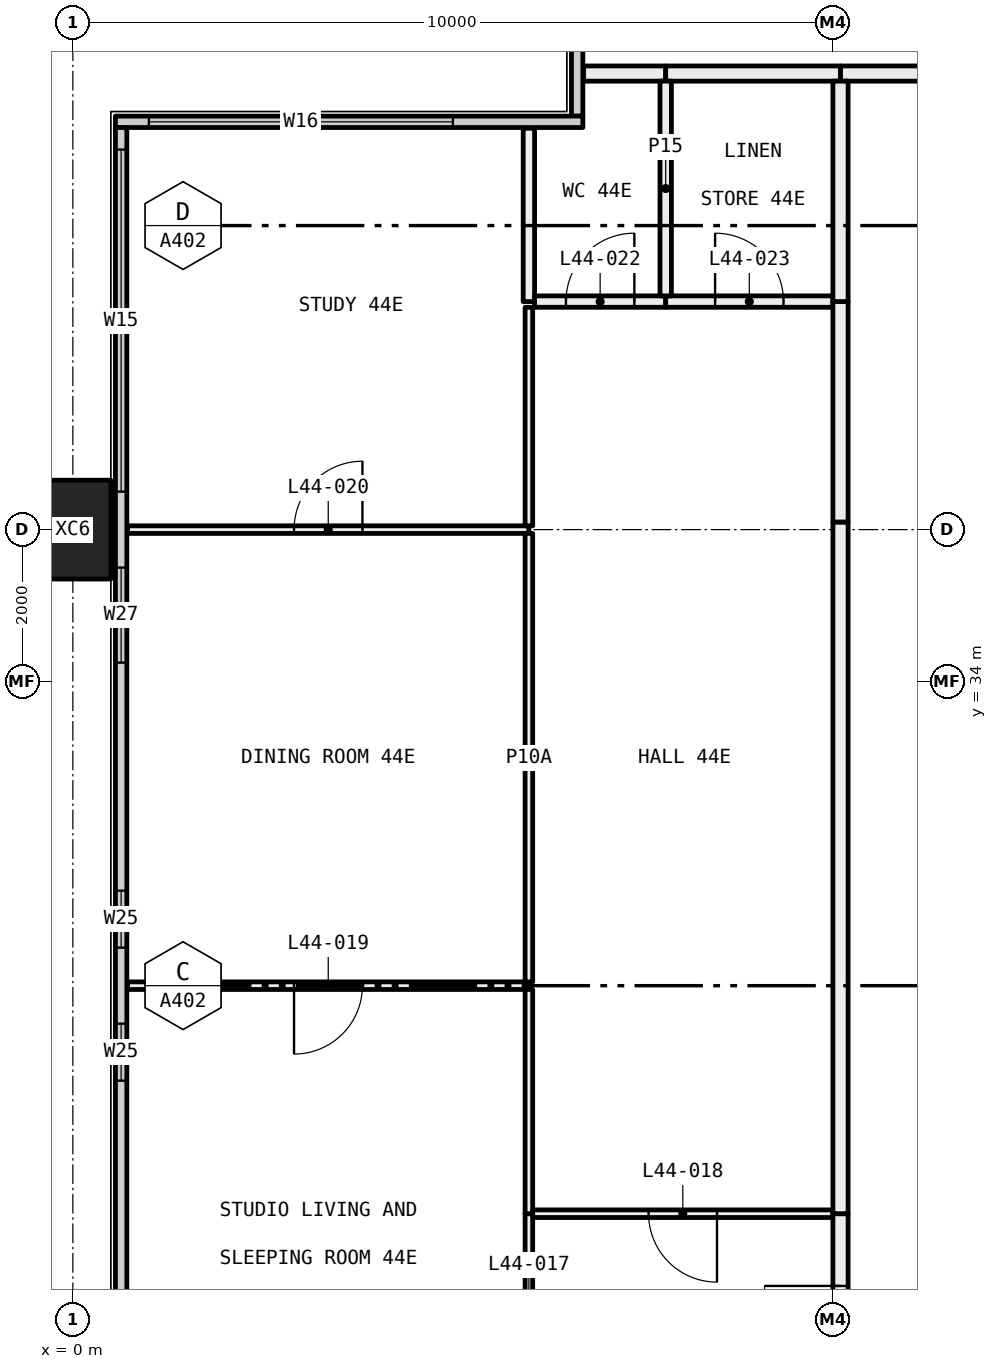
"""IFC4 building model, lengths in metres.
Left out: names, types, materials, properties, quantities, classifications, styles, units other than length and angle.
Written with IfcOpenShell. Run it as: python <this file> out.ifc"""

import sys

from ifc_helpers import new_model, si_unit, direction, frame, frame_2d, origin, origin_2d, place, context, subcontext, project, spatial, rectangle, hollow_rectangle, extrude, element, fill, save


model = new_model("IFC4")
c1 = context("Model", 3, precision=1e-05, world=origin(), true_north=direction((0.0, 1.0)))
c2 = subcontext(c1, "Body", "Model", "MODEL_VIEW")
j1 = project(units=[si_unit("LENGTHUNIT", "METRE"), si_unit("PLANEANGLEUNIT", "RADIAN")], contexts=[c1])
p1 = place(None, origin())
s1 = spatial("IfcSite", under=j1, at=p1, CompositionType="ELEMENT")
p2 = place(p1, origin())
s2 = spatial("IfcBuilding", under=s1, at=p2, CompositionType="ELEMENT")
p3 = place(p2, frame((0.0, 0.0, 168.6)))
s3 = spatial("IfcBuildingStorey", under=s2, at=p3, CompositionType="ELEMENT", Elevation=168.6)
p4 = place(p3, frame((0.0, 36.0, -0.4), z_axis=(0.0, 0.0, 1.0), x_axis=(0.0, 1.0, 0.0)))
e1 = element("IfcColumn", 1, at=p4, inside=s3, PredefinedType="COLUMN", context=c2, shape_type="SweptSolid", body=[
    extrude(hollow_rectangle(XDim=1.3, YDim=1.0, WallThickness=0.05, at=origin_2d()), origin(), (0.0, 0.0, 1.0), 3.45),
])
p5 = place(p3, frame((6.635, 41.44, 0.0), z_axis=(0.0, 0.0, 1.0), x_axis=(0.0, 1.0, 0.0)))
e2 = element("IfcWall", 2, at=p5, inside=s3, PredefinedType="ELEMENTEDWALL", context=c2, shape_type="SweptSolid", body=[
    extrude(rectangle(XDim=5.85, YDim=0.15, at=frame_2d((2.925, 0.0))), origin(), (0.0, 0.0, 1.0), 3.05),
])
p6 = place(p5, frame((1.56, 0.0, 0.45)))
e3 = element("IfcOpeningElement", 3, at=p6, cuts=e2, PredefinedType="OPENING", context=c2, shape_type="SweptSolid", body=[
    extrude(rectangle(XDim=4.0, YDim=2.55, at=frame_2d((2.0, 1.275))), frame((0.0, 0.085, 0.0), z_axis=(0.0, -1.0, 0.0), x_axis=(1.0, 0.0, 0.0)), (0.0, 0.0, 1.0), 0.17),
])
p7 = place(p3, frame((0.56, 41.365, 0.0), z_axis=(0.0, 0.0, 1.0), x_axis=(1.0, 0.0, 0.0)))
e4 = element("IfcWall", 4, at=p7, inside=s3, PredefinedType="ELEMENTEDWALL", context=c2, shape_type="SweptSolid", body=[
    extrude(rectangle(XDim=6.15, YDim=0.15, at=frame_2d((3.075, 0.0))), origin(), (0.0, 0.0, 1.0), 3.05),
])
p8 = place(p7, frame((0.44, 0.0, 0.45)))
e5 = element("IfcOpeningElement", 5, at=p8, cuts=e4, PredefinedType="OPENING", context=c2, shape_type="SweptSolid", body=[
    extrude(rectangle(XDim=4.0, YDim=2.55, at=frame_2d((2.0, 1.275))), frame((0.0, 0.085, 0.0), z_axis=(0.0, -1.0, 0.0), x_axis=(1.0, 0.0, 0.0)), (0.0, 0.0, 1.0), 0.17),
])
p9 = place(p3, frame((0.635, 18.71, 0.0), z_axis=(0.0, 0.0, 1.0), x_axis=(0.0, 1.0, 0.0)))
e6 = element("IfcWall", 6, at=p9, inside=s3, PredefinedType="ELEMENTEDWALL", context=c2, shape_type="SweptSolid", body=[
    extrude(rectangle(XDim=22.58, YDim=0.15, at=frame_2d((11.29, 0.0))), origin(), (0.0, 0.0, 1.0), 3.05),
])
p10 = place(p9, frame((0.29, 0.0, 0.45)))
e7 = element("IfcOpeningElement", 7, at=p10, cuts=e6, PredefinedType="OPENING", context=c2, shape_type="SweptSolid", body=[
    extrude(rectangle(XDim=4.5, YDim=2.55, at=frame_2d((2.25, 1.275))), frame((0.0, 0.085, 0.0), z_axis=(0.0, -1.0, 0.0), x_axis=(1.0, 0.0, 0.0)), (0.0, 0.0, 1.0), 0.17),
])
p11 = place(p9, frame((5.79, 0.0, 0.45)))
e8 = element("IfcOpeningElement", 8, at=p11, cuts=e6, PredefinedType="OPENING", context=c2, shape_type="SweptSolid", body=[
    extrude(rectangle(XDim=1.25, YDim=2.55, at=frame_2d((0.625, 1.275))), frame((0.0, 0.085, 0.0), z_axis=(0.0, -1.0, 0.0), x_axis=(1.0, 0.0, 0.0)), (0.0, 0.0, 1.0), 0.17),
])
p12 = place(p9, frame((10.04, 0.0, 0.45)))
e9 = element("IfcOpeningElement", 9, at=p12, cuts=e6, PredefinedType="OPENING", context=c2, shape_type="SweptSolid", body=[
    extrude(rectangle(XDim=0.75, YDim=2.55, at=frame_2d((0.375, 1.275))), frame((0.0, 0.085, 0.0), z_axis=(0.0, -1.0, 0.0), x_axis=(1.0, 0.0, 0.0)), (0.0, 0.0, 1.0), 0.17),
])
p13 = place(p9, frame((11.79, 0.0, 0.45)))
e10 = element("IfcOpeningElement", 10, at=p13, cuts=e6, PredefinedType="OPENING", context=c2, shape_type="SweptSolid", body=[
    extrude(rectangle(XDim=0.75, YDim=2.55, at=frame_2d((0.375, 1.275))), frame((0.0, 0.085, 0.0), z_axis=(0.0, -1.0, 0.0), x_axis=(1.0, 0.0, 0.0)), (0.0, 0.0, 1.0), 0.17),
])
p14 = place(p9, frame((15.54, 0.0, 0.45)))
e11 = element("IfcOpeningElement", 11, at=p14, cuts=e6, PredefinedType="OPENING", context=c2, shape_type="SweptSolid", body=[
    extrude(rectangle(XDim=1.25, YDim=2.55, at=frame_2d((0.625, 1.275))), frame((0.0, 0.085, 0.0), z_axis=(0.0, -1.0, 0.0), x_axis=(1.0, 0.0, 0.0)), (0.0, 0.0, 1.0), 0.17),
])
p15 = place(p9, frame((17.79, 0.0, 0.45)))
e12 = element("IfcOpeningElement", 12, at=p15, cuts=e6, PredefinedType="OPENING", context=c2, shape_type="SweptSolid", body=[
    extrude(rectangle(XDim=4.5, YDim=2.55, at=frame_2d((2.25, 1.275))), frame((0.0, 0.085, 0.0), z_axis=(0.0, -1.0, 0.0), x_axis=(1.0, 0.0, 0.0)), (0.0, 0.0, 1.0), 0.17),
])
p16 = place(p3, frame((6.72, 42.0, 0.0), z_axis=(0.0, 0.0, 1.0), x_axis=(1.0, 0.0, 0.0)))
e13 = element("IfcWall", 13, at=p16, inside=s3, PredefinedType="PARTITIONING", context=c2, shape_type="SweptSolid", body=[
    extrude(rectangle(XDim=1.08, YDim=0.2, at=frame_2d((0.54, 0.0))), origin(), (0.0, 0.0, 1.0), 3.05),
])
p17 = place(p3, frame((7.8, 42.0, 0.0), z_axis=(0.0, 0.0, 1.0), x_axis=(1.0, 0.0, 0.0)))
e14 = element("IfcWall", 14, at=p17, inside=s3, PredefinedType="PARTITIONING", context=c2, shape_type="SweptSolid", body=[
    extrude(rectangle(XDim=2.3, YDim=0.2, at=frame_2d((1.15, 0.0))), origin(), (0.0, 0.0, 1.0), 3.05),
])
p18 = place(p3, frame((10.1, 42.0, 0.0), z_axis=(0.0, 0.0, 1.0), x_axis=(1.0, 0.0, 0.0)))
e15 = element("IfcWall", 15, at=p18, inside=s3, PredefinedType="PARTITIONING", context=c2, shape_type="SweptSolid", body=[
    extrude(rectangle(XDim=1.9, YDim=0.2, at=frame_2d((0.95, 0.0))), origin(), (0.0, 0.0, 1.0), 3.05),
])
p19 = place(p3, frame((6.0, 30.0, 0.0), z_axis=(0.0, 0.0, 1.0), x_axis=(-1.0, 0.0, 0.0)))
e16 = element("IfcWall", 16, at=p19, inside=s3, PredefinedType="PARTITIONING", context=c2, shape_type="SweptSolid", body=[
    extrude(rectangle(XDim=5.28, YDim=0.1, at=frame_2d((2.64, 0.0))), origin(), (0.0, 0.0, 1.0), 3.05),
])
p20 = place(p19, frame((2.19, 0.0, 0.0)))
e17 = element("IfcOpeningElement", 17, at=p20, cuts=e16, PredefinedType="OPENING", context=c2, shape_type="SweptSolid", body=[
    extrude(rectangle(XDim=0.9, YDim=2.1, at=frame_2d((0.45, 1.05))), frame((0.0, 0.06, 0.0), z_axis=(0.0, -1.0, 0.0), x_axis=(1.0, 0.0, 0.0)), (0.0, 0.0, 1.0), 0.12),
])
p21 = place(p3, frame((6.0, 24.05, 0.0), z_axis=(0.0, 0.0, 1.0), x_axis=(0.0, 1.0, 0.0)))
e18 = element("IfcWall", 18, at=p21, inside=s3, PredefinedType="PARTITIONING", context=c2, shape_type="SweptSolid", body=[
    extrude(rectangle(XDim=2.95, YDim=0.1, at=frame_2d((1.475, 0.0))), origin(), (0.0, 0.0, 1.0), 2.45),
])
p22 = place(p21, frame((1.025, 0.0, 0.0)))
e19 = element("IfcOpeningElement", 19, at=p22, cuts=e18, PredefinedType="OPENING", context=c2, shape_type="SweptSolid", body=[
    extrude(rectangle(XDim=0.9, YDim=2.1, at=frame_2d((0.45, 1.05))), frame((0.0, 0.06, 0.0), z_axis=(0.0, -1.0, 0.0), x_axis=(1.0, 0.0, 0.0)), (0.0, 0.0, 1.0), 0.12),
])
p23 = place(p3, frame((6.0, 27.0, 0.0), z_axis=(0.0, 0.0, 1.0), x_axis=(0.0, 1.0, 0.0)))
e20 = element("IfcWall", 20, at=p23, inside=s3, PredefinedType="PARTITIONING", context=c2, shape_type="SweptSolid", body=[
    extrude(rectangle(XDim=2.95, YDim=0.1, at=frame_2d((1.475, 0.0))), origin(), (0.0, 0.0, 1.0), 3.05),
])
p24 = place(p3, frame((6.0, 36.0, 0.0), z_axis=(0.0, 0.0, 1.0), x_axis=(-1.0, 0.0, 0.0)))
e21 = element("IfcWall", 21, at=p24, inside=s3, PredefinedType="PARTITIONING", context=c2, shape_type="SweptSolid", body=[
    extrude(rectangle(XDim=5.28, YDim=0.1, at=frame_2d((2.64, 0.0))), origin(), (0.0, 0.0, 1.0), 2.45),
])
p25 = place(p24, frame((2.19, 0.0, 0.0)))
e22 = element("IfcOpeningElement", 22, at=p25, cuts=e21, PredefinedType="OPENING", context=c2, shape_type="SweptSolid", body=[
    extrude(rectangle(XDim=0.9, YDim=2.1, at=frame_2d((0.45, 1.05))), frame((0.0, 0.06, 0.0), z_axis=(0.0, -1.0, 0.0), x_axis=(1.0, 0.0, 0.0)), (0.0, 0.0, 1.0), 0.12),
])
p26 = place(p3, frame((6.0, 30.05, 0.0), z_axis=(0.0, 0.0, 1.0), x_axis=(0.0, 1.0, 0.0)))
e23 = element("IfcWall", 23, at=p26, inside=s3, PredefinedType="PARTITIONING", context=c2, shape_type="SweptSolid", body=[
    extrude(rectangle(XDim=5.9, YDim=0.1, at=frame_2d((2.95, 0.0))), origin(), (0.0, 0.0, 1.0), 2.45),
])
p27 = place(p3, frame((6.0, 36.05, 0.0), z_axis=(0.0, 0.0, 1.0), x_axis=(0.0, 1.0, 0.0)))
e24 = element("IfcWall", 24, at=p27, inside=s3, PredefinedType="PARTITIONING", context=c2, shape_type="SweptSolid", body=[
    extrude(rectangle(XDim=2.875, YDim=0.1, at=frame_2d((1.438, 0.0))), origin(), (0.0, 0.0, 1.0), 2.45),
])
p28 = place(p3, frame((6.0, 39.0, 0.0), z_axis=(0.0, 0.0, 1.0), x_axis=(0.0, 1.0, 0.0)))
e25 = element("IfcWall", 25, at=p28, inside=s3, PredefinedType="PARTITIONING", context=c2, shape_type="SweptSolid", body=[
    extrude(rectangle(XDim=2.28, YDim=0.15, at=frame_2d((1.14, 0.0))), origin(), (0.0, 0.0, 1.0), 3.05),
])
p29 = place(p3, frame((10.0, 27.0, 0.0), z_axis=(0.0, 0.0, 1.0), x_axis=(-1.0, 0.0, 0.0)))
e26 = element("IfcWall", 26, at=p29, inside=s3, PredefinedType="PARTITIONING", context=c2, shape_type="SweptSolid", body=[
    extrude(rectangle(XDim=3.95, YDim=0.1, at=frame_2d((1.975, 0.0))), origin(), (0.0, 0.0, 1.0), 3.05),
])
p30 = place(p29, frame((1.525, 0.0, 0.0)))
e27 = element("IfcOpeningElement", 27, at=p30, cuts=e26, PredefinedType="OPENING", context=c2, shape_type="SweptSolid", body=[
    extrude(rectangle(XDim=0.9, YDim=2.1, at=frame_2d((0.45, 1.05))), frame((0.0, 0.06, 0.0), z_axis=(0.0, -1.0, 0.0), x_axis=(1.0, 0.0, 0.0)), (0.0, 0.0, 1.0), 0.12),
])
p31 = place(p3, frame((10.1, 24.1, 0.0), z_axis=(0.0, 0.0, 1.0), x_axis=(0.0, 1.0, 0.0)))
e28 = element("IfcWall", 28, at=p31, inside=s3, PredefinedType="PARTITIONING", context=c2, shape_type="SweptSolid", body=[
    extrude(rectangle(XDim=2.9, YDim=0.2, at=frame_2d((1.45, 0.0))), origin(), (0.0, 0.0, 1.0), 3.05),
])
p32 = place(p31, frame((0.95, 0.0, 0.0)))
e29 = element("IfcOpeningElement", 29, at=p32, cuts=e28, PredefinedType="OPENING", context=c2, shape_type="SweptSolid", body=[
    extrude(rectangle(XDim=1.0, YDim=2.1, at=frame_2d((0.5, 1.05))), frame((0.0, 0.11, 0.0), z_axis=(0.0, -1.0, 0.0), x_axis=(1.0, 0.0, 0.0)), (0.0, 0.0, 1.0), 0.22),
])
p33 = place(p3, frame((7.8, 39.0, 0.0), z_axis=(0.0, 0.0, 1.0), x_axis=(-1.0, 0.0, 0.0)))
e30 = element("IfcWall", 30, at=p33, inside=s3, PredefinedType="PARTITIONING", context=c2, shape_type="SweptSolid", body=[
    extrude(rectangle(XDim=1.725, YDim=0.15, at=frame_2d((0.863, 0.0))), origin(), (0.0, 0.0, 1.0), 3.05),
])
p34 = place(p33, frame((0.413, 0.0, 0.0)))
e31 = element("IfcOpeningElement", 31, at=p34, cuts=e30, PredefinedType="OPENING", context=c2, shape_type="SweptSolid", body=[
    extrude(rectangle(XDim=0.9, YDim=2.1, at=frame_2d((0.45, 1.05))), frame((0.0, 0.085, 0.0), z_axis=(0.0, -1.0, 0.0), x_axis=(1.0, 0.0, 0.0)), (0.0, 0.0, 1.0), 0.17),
])
p35 = place(p3, frame((10.0, 39.0, 0.0), z_axis=(0.0, 0.0, 1.0), x_axis=(-1.0, 0.0, 0.0)))
e32 = element("IfcWall", 32, at=p35, inside=s3, PredefinedType="PARTITIONING", context=c2, shape_type="SweptSolid", body=[
    extrude(rectangle(XDim=2.2, YDim=0.15, at=frame_2d((1.1, 0.0))), origin(), (0.0, 0.0, 1.0), 3.05),
])
p36 = place(p35, frame((0.65, 0.0, 0.0)))
e33 = element("IfcOpeningElement", 33, at=p36, cuts=e32, PredefinedType="OPENING", context=c2, shape_type="SweptSolid", body=[
    extrude(rectangle(XDim=0.9, YDim=2.1, at=frame_2d((0.45, 1.05))), frame((0.0, 0.085, 0.0), z_axis=(0.0, -1.0, 0.0), x_axis=(1.0, 0.0, 0.0)), (0.0, 0.0, 1.0), 0.17),
])
p37 = place(p3, frame((10.1, 27.0, 0.0), z_axis=(0.0, 0.0, 1.0), x_axis=(0.0, 1.0, 0.0)))
e34 = element("IfcWall", 34, at=p37, inside=s3, PredefinedType="PARTITIONING", context=c2, shape_type="SweptSolid", body=[
    extrude(rectangle(XDim=9.1, YDim=0.2, at=frame_2d((4.55, 0.0))), origin(), (0.0, 0.0, 1.0), 2.45),
])
p38 = place(p3, frame((10.1, 36.1, 0.0), z_axis=(0.0, 0.0, 1.0), x_axis=(0.0, 1.0, 0.0)))
e35 = element("IfcWall", 35, at=p38, inside=s3, PredefinedType="PARTITIONING", context=c2, shape_type="SweptSolid", body=[
    extrude(rectangle(XDim=2.9, YDim=0.2, at=frame_2d((1.45, 0.0))), origin(), (0.0, 0.0, 1.0), 3.05),
])
p39 = place(p3, frame((7.8, 39.075, 0.0), z_axis=(0.0, 0.0, 1.0), x_axis=(0.0, 1.0, 0.0)))
e36 = element("IfcWall", 36, at=p39, inside=s3, PredefinedType="PARTITIONING", context=c2, shape_type="SweptSolid", body=[
    extrude(rectangle(XDim=2.825, YDim=0.15, at=frame_2d((1.413, 0.0))), origin(), (0.0, 0.0, 1.0), 3.05),
])
p40 = place(p3, frame((10.1, 39.0, 0.0), z_axis=(0.0, 0.0, 1.0), x_axis=(0.0, 1.0, 0.0)))
e37 = element("IfcWall", 37, at=p40, inside=s3, PredefinedType="PARTITIONING", context=c2, shape_type="SweptSolid", body=[
    extrude(rectangle(XDim=2.9, YDim=0.2, at=frame_2d((1.45, 0.0))), origin(), (0.0, 0.0, 1.0), 3.05),
])
p41 = place(p8, origin())
e38 = element("IfcWindow", 38, at=p41, inside=s3, PartitioningType="SINGLE_PANEL", PredefinedType="WINDOW", context=c2, shape_type="SweptSolid", body=[
    extrude(rectangle(XDim=4.0, YDim=2.55, at=frame_2d((2.0, 1.275))), frame((0.0, 0.03, 0.0), z_axis=(0.0, -1.0, 0.0), x_axis=(1.0, 0.0, 0.0)), (0.0, 0.0, 1.0), 0.06),
])
fill(e5, e38)
p42 = place(p12, origin())
e39 = element("IfcWindow", 39, at=p42, inside=s3, PartitioningType="SINGLE_PANEL", PredefinedType="WINDOW", context=c2, shape_type="SweptSolid", body=[
    extrude(rectangle(XDim=0.75, YDim=2.55, at=frame_2d((0.375, 1.275))), frame((0.0, 0.03, 0.0), z_axis=(0.0, -1.0, 0.0), x_axis=(1.0, 0.0, 0.0)), (0.0, 0.0, 1.0), 0.06),
])
fill(e9, e39)
p43 = place(p13, origin())
e40 = element("IfcWindow", 40, at=p43, inside=s3, PartitioningType="SINGLE_PANEL", PredefinedType="WINDOW", context=c2, shape_type="SweptSolid", body=[
    extrude(rectangle(XDim=0.75, YDim=2.55, at=frame_2d((0.375, 1.275))), frame((0.0, 0.03, 0.0), z_axis=(0.0, -1.0, 0.0), x_axis=(1.0, 0.0, 0.0)), (0.0, 0.0, 1.0), 0.06),
])
fill(e10, e40)
p44 = place(p14, origin())
e41 = element("IfcWindow", 41, at=p44, inside=s3, PartitioningType="SINGLE_PANEL", PredefinedType="WINDOW", context=c2, shape_type="SweptSolid", body=[
    extrude(rectangle(XDim=1.25, YDim=2.55, at=frame_2d((0.625, 1.275))), frame((0.0, 0.03, 0.0), z_axis=(0.0, -1.0, 0.0), x_axis=(1.0, 0.0, 0.0)), (0.0, 0.0, 1.0), 0.06),
])
fill(e11, e41)
p45 = place(p15, origin())
e42 = element("IfcWindow", 42, at=p45, inside=s3, PartitioningType="SINGLE_PANEL", PredefinedType="WINDOW", context=c2, shape_type="SweptSolid", body=[
    extrude(rectangle(XDim=4.5, YDim=2.55, at=frame_2d((2.25, 1.275))), frame((0.0, 0.03, 0.0), z_axis=(0.0, -1.0, 0.0), x_axis=(1.0, 0.0, 0.0)), (0.0, 0.0, 1.0), 0.06),
])
fill(e12, e42)
p46 = place(p32, origin())
e43 = element("IfcDoor", 43, at=p46, inside=s3, OperationType="SINGLE_SWING_LEFT", PredefinedType="DOOR", context=c2, shape_type="SweptSolid", body=[
    extrude(rectangle(XDim=1.0, YDim=2.1, at=frame_2d((0.5, 1.05))), frame((0.0, 0.025, 0.0), z_axis=(0.0, -1.0, 0.0), x_axis=(1.0, 0.0, 0.0)), (0.0, 0.0, 1.0), 0.05),
])
fill(e29, e43)
p47 = place(p30, origin())
e44 = element("IfcDoor", 44, at=p47, inside=s3, OperationType="SINGLE_SWING_RIGHT", PredefinedType="DOOR", context=c2, shape_type="SweptSolid", body=[
    extrude(rectangle(XDim=0.9, YDim=2.1, at=frame_2d((0.45, 1.05))), frame((0.0, 0.025, 0.0), z_axis=(0.0, -1.0, 0.0), x_axis=(1.0, 0.0, 0.0)), (0.0, 0.0, 1.0), 0.05),
])
fill(e27, e44)
p48 = place(p20, origin())
e45 = element("IfcDoor", 45, at=p48, inside=s3, OperationType="SINGLE_SWING_LEFT", PredefinedType="DOOR", context=c2, shape_type="SweptSolid", body=[
    extrude(rectangle(XDim=0.9, YDim=2.1, at=frame_2d((0.45, 1.05))), frame((0.0, 0.025, 0.0), z_axis=(0.0, -1.0, 0.0), x_axis=(1.0, 0.0, 0.0)), (0.0, 0.0, 1.0), 0.05),
])
fill(e17, e45)
p49 = place(p25, frame((0.9, 0.0, 0.0), x_axis=(-1.0, 0.0, 0.0)))
e46 = element("IfcDoor", 46, at=p49, inside=s3, OperationType="SINGLE_SWING_LEFT", PredefinedType="DOOR", context=c2, shape_type="SweptSolid", body=[
    extrude(rectangle(XDim=0.9, YDim=2.1, at=frame_2d((0.45, 1.05))), frame((0.0, 0.025, 0.0), z_axis=(0.0, -1.0, 0.0), x_axis=(1.0, 0.0, 0.0)), (0.0, 0.0, 1.0), 0.05),
])
fill(e22, e46)
p50 = place(p34, frame((0.9, 0.0, 0.0), x_axis=(-1.0, 0.0, 0.0)))
e47 = element("IfcDoor", 47, at=p50, inside=s3, OperationType="SINGLE_SWING_LEFT", PredefinedType="DOOR", context=c2, shape_type="SweptSolid", body=[
    extrude(rectangle(XDim=0.9, YDim=2.1, at=frame_2d((0.45, 1.05))), frame((0.0, 0.025, 0.0), z_axis=(0.0, -1.0, 0.0), x_axis=(1.0, 0.0, 0.0)), (0.0, 0.0, 1.0), 0.05),
])
fill(e31, e47)
p51 = place(p36, frame((0.9, 0.0, 0.0), x_axis=(-1.0, 0.0, 0.0)))
e48 = element("IfcDoor", 48, at=p51, inside=s3, OperationType="SINGLE_SWING_RIGHT", PredefinedType="DOOR", context=c2, shape_type="SweptSolid", body=[
    extrude(rectangle(XDim=0.9, YDim=2.1, at=frame_2d((0.45, 1.05))), frame((0.0, 0.025, 0.0), z_axis=(0.0, -1.0, 0.0), x_axis=(1.0, 0.0, 0.0)), (0.0, 0.0, 1.0), 0.05),
])
fill(e33, e48)
save(model, sys.argv[1])
